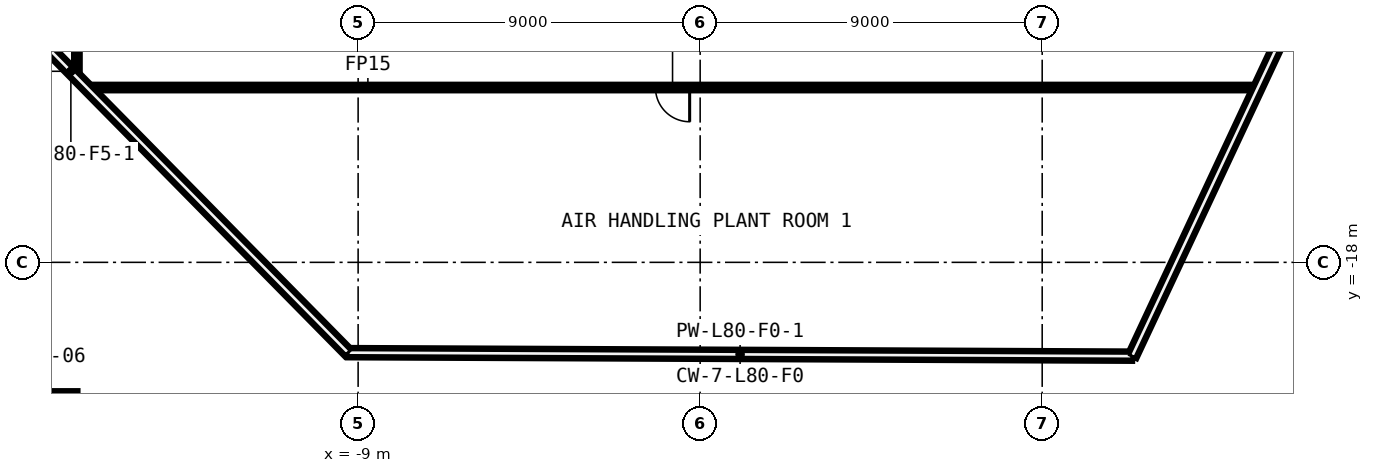
"""IFC4 building model, lengths in metres.
Left out: names, types, materials, properties, quantities, classifications, styles, units other than length and angle.
Written with IfcOpenShell. Run it as: python <this file> out.ifc"""

import sys

from ifc_helpers import new_model, si_unit, direction, frame, frame_2d, origin, origin_2d, place, context, subcontext, project, spatial, rectangle, hollow_rectangle, extrude, element, fill, save


model = new_model("IFC4")
c1 = context("Model", 3, precision=1e-05, world=origin(), true_north=direction((0.0, 1.0)))
c2 = subcontext(c1, "Body", "Model", "MODEL_VIEW")
j1 = project(units=[si_unit("LENGTHUNIT", "METRE"), si_unit("PLANEANGLEUNIT", "RADIAN")], contexts=[c1])
p1 = place(None, origin())
s1 = spatial("IfcSite", under=j1, at=p1, CompositionType="ELEMENT")
p2 = place(p1, origin())
s2 = spatial("IfcBuilding", under=s1, at=p2, CompositionType="ELEMENT")
p3 = place(p2, frame((0.0, 0.0, 371.6)))
s3 = spatial("IfcBuildingStorey", under=s2, at=p3, CompositionType="ELEMENT", Elevation=371.6)
p4 = place(p3, frame((-17.084, -22.089, 0.0), z_axis=(0.0, 0.0, 1.0), x_axis=(1.0, 0.0, 0.0)))
e1 = element("IfcColumn", 1, at=p4, inside=s3, PredefinedType="COLUMN", context=c2, shape_type="SweptSolid", body=[
    extrude(hollow_rectangle(XDim=1.4, YDim=1.4, WallThickness=0.06, at=origin_2d()), origin(), (0.0, 0.0, 1.0), 4.2),
])
p5 = place(p3, frame((14.656, -13.4, 0.0), z_axis=(0.0, 0.0, 1.0), x_axis=(-1.0, 0.0, 0.0)))
e2 = element("IfcWall", 2, at=p5, inside=s3, PredefinedType="PARTITIONING", context=c2, shape_type="SweptSolid", body=[
    extrude(rectangle(XDim=30.765, YDim=0.15, at=frame_2d((15.383, 0.0))), origin(), (0.0, 0.0, 1.0), 3.9),
])
p6 = place(p5, frame((14.933, 0.0, 0.0)))
e3 = element("IfcOpeningElement", 3, at=p6, cuts=e2, PredefinedType="OPENING", context=c2, shape_type="SweptSolid", body=[
    extrude(rectangle(XDim=0.9, YDim=2.1, at=frame_2d((0.45, 1.05))), frame((0.0, 0.085, 0.0), z_axis=(0.0, -1.0, 0.0), x_axis=(1.0, 0.0, 0.0)), (0.0, 0.0, 1.0), 0.17),
])
p7 = place(p3, frame((-16.4, -13.105, 0.0), z_axis=(0.0, 0.0, 1.0), x_axis=(0.0, 1.0, 0.0)))
e4 = element("IfcWall", 4, at=p7, inside=s3, PredefinedType="PARTITIONING", context=c2, shape_type="SweptSolid", body=[
    extrude(rectangle(XDim=22.641, YDim=0.15, at=frame_2d((11.321, 0.0))), origin(), (0.0, 0.0, 1.0), 3.9),
])
p8 = place(p7, frame((10.871, 0.0, 0.0)))
e5 = element("IfcOpeningElement", 5, at=p8, cuts=e4, PredefinedType="OPENING", context=c2, shape_type="SweptSolid", body=[
    extrude(rectangle(XDim=0.9, YDim=2.1, at=frame_2d((0.45, 1.05))), frame((0.0, 0.085, 0.0), z_axis=(0.0, -1.0, 0.0), x_axis=(1.0, 0.0, 0.0)), (0.0, 0.0, 1.0), 0.17),
])
p9 = place(p3, frame((-9.266, -20.377, 0.0), z_axis=(0.0, 0.0, 1.0), x_axis=(0.999990050783, -0.004460755013, 0.0)))
e6 = element("IfcWall", 6, at=p9, inside=s3, PredefinedType="SOLIDWALL", context=c2, shape_type="SweptSolid", body=[
    extrude(rectangle(XDim=20.634, YDim=0.25, at=frame_2d((10.317, 0.0))), origin(), (0.0, 0.0, 1.0), 3.8),
])
p10 = place(p3, frame((11.367, -20.469, 0.0), z_axis=(0.0, 0.0, 1.0), x_axis=(0.424125024155, 0.905603646131, 0.0)))
e7 = element("IfcWall", 7, at=p10, inside=s3, PredefinedType="SOLIDWALL", context=c2, shape_type="SweptSolid", body=[
    extrude(rectangle(XDim=28.801, YDim=0.25, at=frame_2d((14.401, 0.0))), origin(), (0.0, 0.0, 1.0), 3.8),
])
p11 = place(p3, frame((-23.851, -5.568, 0.0), z_axis=(0.0, 0.0, 1.0), x_axis=(0.701718568407, -0.712454244673, 0.0)))
e8 = element("IfcWall", 8, at=p11, inside=s3, PredefinedType="SOLIDWALL", context=c2, shape_type="SweptSolid", body=[
    extrude(rectangle(XDim=20.785, YDim=0.25, at=frame_2d((10.393, 0.0))), origin(), (0.0, 0.0, 1.0), 3.8),
])
p12 = place(p6, origin())
e9 = element("IfcDoor", 9, at=p12, inside=s3, OperationType="SINGLE_SWING_LEFT", PredefinedType="DOOR", context=c2, shape_type="SweptSolid", body=[
    extrude(rectangle(XDim=0.9, YDim=2.1, at=frame_2d((0.45, 1.05))), frame((0.0, 0.025, 0.0), z_axis=(0.0, -1.0, 0.0), x_axis=(1.0, 0.0, 0.0)), (0.0, 0.0, 1.0), 0.05),
])
fill(e3, e9)
save(model, sys.argv[1])
